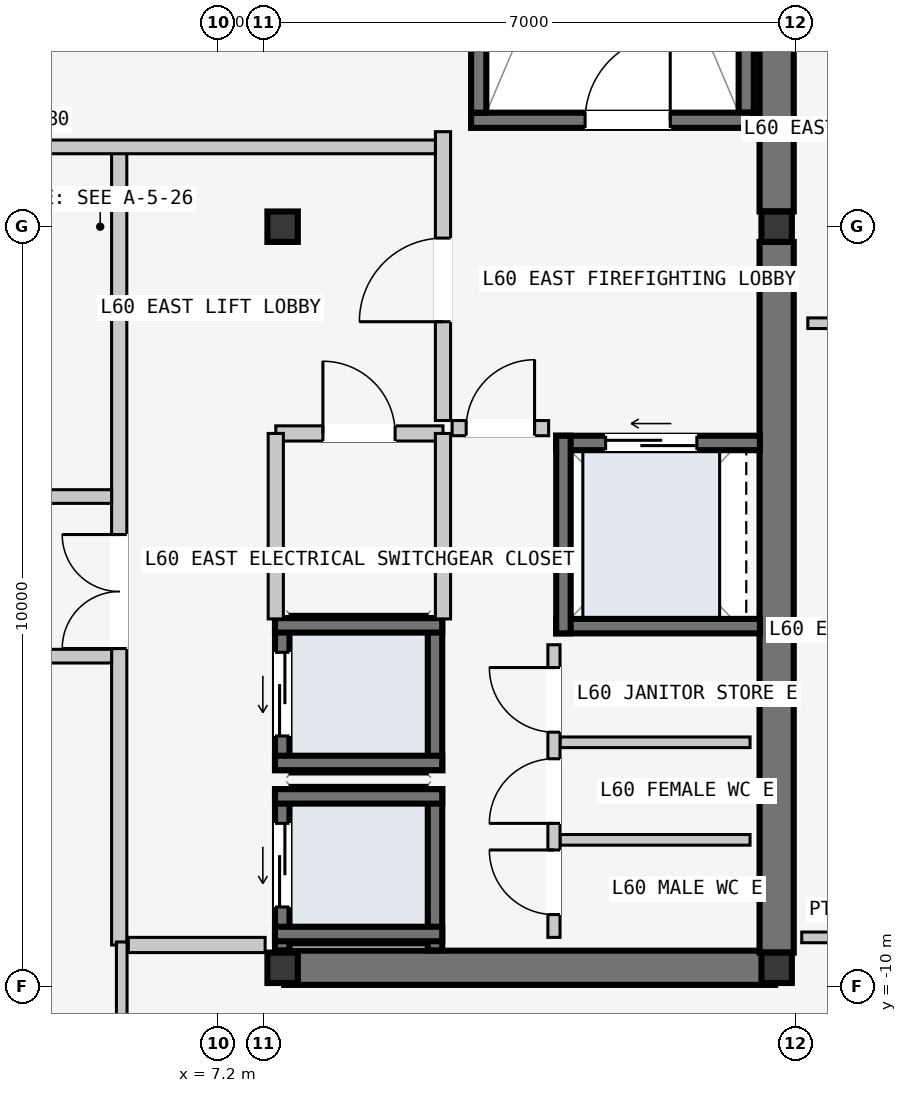
"""IFC4 building model, lengths in metres.
Left out: names, types, materials, properties, quantities, classifications, styles, units other than length and angle.
Written with IfcOpenShell. Run it as: python <this file> out.ifc"""

import sys

from ifc_helpers import new_model, si_unit, direction, frame, frame_2d, origin, origin_2d, place, context, subcontext, project, spatial, rectangle, i_section, extrude, element, fill, save


model = new_model("IFC4")
c1 = context("Model", 3, precision=1e-05, world=origin(), true_north=direction((0.0, 1.0)))
c2 = subcontext(c1, "Body", "Model", "MODEL_VIEW")
j1 = project(units=[si_unit("LENGTHUNIT", "METRE"), si_unit("PLANEANGLEUNIT", "RADIAN")], contexts=[c1])
p1 = place(None, origin())
s1 = spatial("IfcSite", under=j1, at=p1, CompositionType="ELEMENT")
p2 = place(p1, origin())
s2 = spatial("IfcBuilding", under=s1, at=p2, CompositionType="ELEMENT")
p3 = place(p2, frame((0.0, 0.0, 229.2)))
s3 = spatial("IfcBuildingStorey", under=s2, at=p3, CompositionType="ELEMENT", Elevation=229.2)
p4 = place(p3, frame((8.07, -9.75, -0.2), z_axis=(0.0, 0.0, 1.0), x_axis=(1.0, 0.0, 0.0)))
e1 = element("IfcWall", 1, at=p4, inside=s3, PredefinedType="SHEAR", context=c2, shape_type="SweptSolid", body=[
    extrude(rectangle(XDim=6.46, YDim=0.45, at=frame_2d((3.23, 0.0))), origin(), (0.0, 0.0, 1.0), 3.6),
])
for number, where, z_axis, x_axis in (
    (2, (14.55, -9.55, -0.2), (0.0, 0.0, 1.0), (0.0, 1.0, 0.0)),
    (3, (14.55, 0.2, -0.2), (0.0, 0.0, 1.0), (0.0, 1.0, 0.0)),
):
    element("IfcWall", number, at=place(p3, frame(where, z_axis=z_axis, x_axis=x_axis)), inside=s3, PredefinedType="SHEAR", context=c2, shape_type="SweptSolid", body=[
        extrude(rectangle(XDim=9.35, YDim=0.45, at=frame_2d((4.675, 0.0))), origin(), (0.0, 0.0, 1.0), 3.6),
    ])
p5 = place(p3, frame((14.15, 1.5, -0.2), z_axis=(0.0, 0.0, 1.0), x_axis=(0.0, 1.0, 0.0)))
e4 = element("IfcWall", 4, at=p5, inside=s3, PredefinedType="SOLIDWALL", context=c2, shape_type="SweptSolid", body=[
    extrude(rectangle(XDim=7.8, YDim=0.2, at=frame_2d((3.9, 0.0))), origin(), (0.0, 0.0, 1.0), 3.6),
])
p6 = place(p3, frame((10.53, 1.4, -0.2), z_axis=(0.0, 0.0, 1.0), x_axis=(1.0, 0.0, 0.0)))
e5 = element("IfcWall", 5, at=p6, inside=s3, PredefinedType="SOLIDWALL", context=c2, shape_type="SweptSolid", body=[
    extrude(rectangle(XDim=3.72, YDim=0.2, at=frame_2d((1.86, 0.0))), origin(), (0.0, 0.0, 1.0), 3.6),
])
p7 = place(p6, frame((1.5, 0.0, 0.2)))
e6 = element("IfcOpeningElement", 6, at=p7, cuts=e5, PredefinedType="OPENING", context=c2, shape_type="SweptSolid", body=[
    extrude(rectangle(XDim=1.12, YDim=2.18, at=frame_2d((0.56, 1.09))), frame((0.0, 0.11, 0.0), z_axis=(0.0, -1.0, 0.0), x_axis=(1.0, 0.0, 0.0)), (0.0, 0.0, 1.0), 0.22),
])
p8 = place(p3, frame((10.63, 1.5, -0.2), z_axis=(0.0, 0.0, 1.0), x_axis=(0.0, 1.0, 0.0)))
e7 = element("IfcWall", 7, at=p8, inside=s3, PredefinedType="SOLIDWALL", context=c2, shape_type="SweptSolid", body=[
    extrude(rectangle(XDim=7.8, YDim=0.2, at=frame_2d((3.9, 0.0))), origin(), (0.0, 0.0, 1.0), 3.6),
])
for number, where, z_axis, x_axis in (
    (8, (8.05, -9.75, 0.0), (0.0, 0.0, 1.0), (1.0, 0.0, 0.0)),
    (9, (8.05, 0.0, 0.0), (0.0, 0.0, 1.0), (1.0, 0.0, 0.0)),
    (10, (14.55, -9.75, 0.0), (0.0, 0.0, 1.0), (1.0, 0.0, 0.0)),
    (11, (14.55, 0.0, 0.0), (0.0, 0.0, 1.0), (1.0, 0.0, 0.0)),
):
    element("IfcColumn", number, at=place(p3, frame(where, z_axis=z_axis, x_axis=x_axis)), inside=s3, PredefinedType="COLUMN", context=c2, shape_type="SweptSolid", body=[
        extrude(i_section(OverallWidth=0.4, OverallDepth=0.4, WebThickness=0.013, FlangeThickness=0.021, at=origin_2d()), origin(), (0.0, 0.0, 1.0), 3.6),
    ])
p9 = place(p3, frame((8.045, -9.52, -0.2), z_axis=(0.0, 0.0, 1.0), x_axis=(0.0, 1.0, 0.0)))
e12 = element("IfcWall", 12, at=p9, inside=s3, PredefinedType="SOLIDWALL", context=c2, shape_type="SweptSolid", body=[
    extrude(rectangle(XDim=2.12, YDim=0.19, at=frame_2d((1.06, 0.0))), origin(), (0.0, 0.0, 1.0), 3.6),
])
p10 = place(p9, frame((0.57, 0.0, 0.2)))
e13 = element("IfcOpeningElement", 13, at=p10, cuts=e12, PredefinedType="OPENING", context=c2, shape_type="SweptSolid", body=[
    extrude(rectangle(XDim=1.1, YDim=2.2, at=frame_2d((0.55, 1.1))), frame((0.0, 0.105, 0.0), z_axis=(0.0, -1.0, 0.0), x_axis=(1.0, 0.0, 0.0)), (0.0, 0.0, 1.0), 0.21),
])
p11 = place(p3, frame((10.055, -9.52, -0.2), z_axis=(0.0, 0.0, 1.0), x_axis=(0.0, 1.0, 0.0)))
e14 = element("IfcWall", 14, at=p11, inside=s3, PredefinedType="SOLIDWALL", context=c2, shape_type="SweptSolid", body=[
    extrude(rectangle(XDim=2.12, YDim=0.19, at=frame_2d((1.06, 0.0))), origin(), (0.0, 0.0, 1.0), 3.6),
])
for number, where, z_axis, x_axis in (
    (15, (7.95, -7.495, -0.2), (0.0, 0.0, 1.0), (1.0, 0.0, 0.0)),
    (16, (7.95, -9.305, -0.2), (0.0, 0.0, 1.0), (1.0, 0.0, 0.0)),
):
    element("IfcWall", number, at=place(p3, frame(where, z_axis=z_axis, x_axis=x_axis)), inside=s3, PredefinedType="SOLIDWALL", context=c2, shape_type="SweptSolid", body=[
        extrude(rectangle(XDim=2.2, YDim=0.19, at=frame_2d((1.1, 0.0))), origin(), (0.0, 0.0, 1.0), 3.6),
    ])
p12 = place(p3, frame((8.045, -7.15, -0.2), z_axis=(0.0, 0.0, 1.0), x_axis=(0.0, 1.0, 0.0)))
e17 = element("IfcWall", 17, at=p12, inside=s3, PredefinedType="SOLIDWALL", context=c2, shape_type="SweptSolid", body=[
    extrude(rectangle(XDim=2.0, YDim=0.19, at=frame_2d((1.0, 0.0))), origin(), (0.0, 0.0, 1.0), 3.6),
])
p13 = place(p12, frame((0.45, 0.0, 0.2)))
e18 = element("IfcOpeningElement", 18, at=p13, cuts=e17, PredefinedType="OPENING", context=c2, shape_type="SweptSolid", body=[
    extrude(rectangle(XDim=1.1, YDim=2.2, at=frame_2d((0.55, 1.1))), frame((0.0, 0.105, 0.0), z_axis=(0.0, -1.0, 0.0), x_axis=(1.0, 0.0, 0.0)), (0.0, 0.0, 1.0), 0.21),
])
p14 = place(p3, frame((10.055, -7.15, -0.2), z_axis=(0.0, 0.0, 1.0), x_axis=(0.0, 1.0, 0.0)))
e19 = element("IfcWall", 19, at=p14, inside=s3, PredefinedType="SOLIDWALL", context=c2, shape_type="SweptSolid", body=[
    extrude(rectangle(XDim=2.0, YDim=0.19, at=frame_2d((1.0, 0.0))), origin(), (0.0, 0.0, 1.0), 3.6),
])
for number, where, z_axis, x_axis in (
    (20, (7.95, -5.245, -0.2), (0.0, 0.0, 1.0), (1.0, 0.0, 0.0)),
    (21, (7.95, -7.055, -0.2), (0.0, 0.0, 1.0), (1.0, 0.0, 0.0)),
):
    element("IfcWall", number, at=place(p3, frame(where, z_axis=z_axis, x_axis=x_axis)), inside=s3, PredefinedType="SOLIDWALL", context=c2, shape_type="SweptSolid", body=[
        extrude(rectangle(XDim=2.2, YDim=0.19, at=frame_2d((1.1, 0.0))), origin(), (0.0, 0.0, 1.0), 3.6),
    ])
p15 = place(p3, frame((11.65, -2.845, -0.2), z_axis=(0.0, 0.0, 1.0), x_axis=(1.0, 0.0, 0.0)))
e22 = element("IfcWall", 22, at=p15, inside=s3, PredefinedType="SOLIDWALL", context=c2, shape_type="SweptSolid", body=[
    extrude(rectangle(XDim=2.68, YDim=0.19, at=frame_2d((1.34, 0.0))), origin(), (0.0, 0.0, 1.0), 3.6),
])
p16 = place(p15, frame((0.65, 0.0, 0.2)))
e23 = element("IfcOpeningElement", 23, at=p16, cuts=e22, PredefinedType="OPENING", context=c2, shape_type="SweptSolid", body=[
    extrude(rectangle(XDim=1.2, YDim=2.2, at=frame_2d((0.6, 1.1))), frame((0.0, 0.105, 0.0), z_axis=(0.0, -1.0, 0.0), x_axis=(1.0, 0.0, 0.0)), (0.0, 0.0, 1.0), 0.21),
])
p17 = place(p3, frame((11.65, -5.255, -0.2), z_axis=(0.0, 0.0, 1.0), x_axis=(1.0, 0.0, 0.0)))
e24 = element("IfcWall", 24, at=p17, inside=s3, PredefinedType="SOLIDWALL", context=c2, shape_type="SweptSolid", body=[
    extrude(rectangle(XDim=2.68, YDim=0.19, at=frame_2d((1.34, 0.0))), origin(), (0.0, 0.0, 1.0), 3.6),
])
p18 = place(p3, frame((11.745, -5.35, -0.2), z_axis=(0.0, 0.0, 1.0), x_axis=(0.0, 1.0, 0.0)))
e25 = element("IfcWall", 25, at=p18, inside=s3, PredefinedType="SOLIDWALL", context=c2, shape_type="SweptSolid", body=[
    extrude(rectangle(XDim=2.6, YDim=0.19, at=frame_2d((1.3, 0.0))), origin(), (0.0, 0.0, 1.0), 3.6),
])
p19 = place(p3, frame((5.9, -9.45, 0.0), z_axis=(0.0, 0.0, 1.0), x_axis=(0.0, 1.0, 0.0)))
e26 = element("IfcWall", 26, at=p19, inside=s3, PredefinedType="PARTITIONING", context=c2, shape_type="SweptSolid", body=[
    extrude(rectangle(XDim=10.5, YDim=0.2, at=frame_2d((5.25, 0.0))), origin(), (0.0, 0.0, 1.0), 3.4),
])
p20 = place(p19, frame((3.9, 0.0, 0.0)))
e27 = element("IfcOpeningElement", 27, at=p20, cuts=e26, PredefinedType="OPENING", context=c2, shape_type="SweptSolid", body=[
    extrude(rectangle(XDim=1.5, YDim=2.2, at=frame_2d((0.75, 1.1))), frame((0.0, 0.11, 0.0), z_axis=(0.0, -1.0, 0.0), x_axis=(1.0, 0.0, 0.0)), (0.0, 0.0, 1.0), 0.22),
])
p21 = place(p3, frame((6.02, -9.45, 0.0), z_axis=(0.0, 0.0, 1.0), x_axis=(1.0, 0.0, 0.0)))
e28 = element("IfcWall", 28, at=p21, inside=s3, PredefinedType="PARTITIONING", context=c2, shape_type="SweptSolid", body=[
    extrude(rectangle(XDim=1.8, YDim=0.2, at=frame_2d((0.9, 0.0))), origin(), (0.0, 0.0, 1.0), 3.4),
])
p22 = place(p3, frame((10.16, -2.55, 0.0), z_axis=(0.0, 0.0, 1.0), x_axis=(0.0, 1.0, 0.0)))
e29 = element("IfcWall", 29, at=p22, inside=s3, PredefinedType="PARTITIONING", context=c2, shape_type="SweptSolid", body=[
    extrude(rectangle(XDim=3.8, YDim=0.2, at=frame_2d((1.9, 0.0))), origin(), (0.0, 0.0, 1.0), 3.4),
])
p23 = place(p22, frame((1.3, 0.0, 0.0)))
e30 = element("IfcOpeningElement", 30, at=p23, cuts=e29, PredefinedType="OPENING", context=c2, shape_type="SweptSolid", body=[
    extrude(rectangle(XDim=1.1, YDim=2.15, at=frame_2d((0.55, 1.075))), frame((0.0, 0.11, 0.0), z_axis=(0.0, -1.0, 0.0), x_axis=(1.0, 0.0, 0.0)), (0.0, 0.0, 1.0), 0.22),
])
p24 = place(p3, frame((10.28, -2.65, 0.0), z_axis=(0.0, 0.0, 1.0), x_axis=(1.0, 0.0, 0.0)))
e31 = element("IfcWall", 31, at=p24, inside=s3, PredefinedType="PARTITIONING", context=c2, shape_type="SweptSolid", body=[
    extrude(rectangle(XDim=1.27, YDim=0.2, at=frame_2d((0.635, 0.0))), origin(), (0.0, 0.0, 1.0), 3.4),
])
p25 = place(p24, frame((0.185, 0.0, 0.0)))
e32 = element("IfcOpeningElement", 32, at=p25, cuts=e31, PredefinedType="OPENING", context=c2, shape_type="SweptSolid", body=[
    extrude(rectangle(XDim=0.9, YDim=2.15, at=frame_2d((0.45, 1.075))), frame((0.0, 0.11, 0.0), z_axis=(0.0, -1.0, 0.0), x_axis=(1.0, 0.0, 0.0)), (0.0, 0.0, 1.0), 0.22),
])
p26 = place(p3, frame((7.96, -2.72, 0.0), z_axis=(0.0, 0.0, 1.0), x_axis=(1.0, 0.0, 0.0)))
e33 = element("IfcWall", 33, at=p26, inside=s3, PredefinedType="PARTITIONING", context=c2, shape_type="SweptSolid", body=[
    extrude(rectangle(XDim=2.2, YDim=0.2, at=frame_2d((1.1, 0.0))), origin(), (0.0, 0.0, 1.0), 3.4),
])
p27 = place(p26, frame((0.62, 0.0, 0.0)))
e34 = element("IfcOpeningElement", 34, at=p27, cuts=e33, PredefinedType="OPENING", context=c2, shape_type="SweptSolid", body=[
    extrude(rectangle(XDim=0.95, YDim=2.1, at=frame_2d((0.475, 1.05))), frame((0.0, 0.11, 0.0), z_axis=(0.0, -1.0, 0.0), x_axis=(1.0, 0.0, 0.0)), (0.0, 0.0, 1.0), 0.22),
])
for number, where, z_axis, x_axis in (
    (35, (7.96, -5.16, 0.0), (0.0, 0.0, 1.0), (0.0, 1.0, 0.0)),
    (36, (10.16, -5.16, 0.0), (0.0, 0.0, 1.0), (0.0, 1.0, 0.0)),
):
    element("IfcWall", number, at=place(p3, frame(where, z_axis=z_axis, x_axis=x_axis)), inside=s3, PredefinedType="PARTITIONING", context=c2, shape_type="SweptSolid", body=[
        extrude(rectangle(XDim=2.44, YDim=0.2, at=frame_2d((1.22, 0.0))), origin(), (0.0, 0.0, 1.0), 3.4),
    ])
for number, where, z_axis, x_axis in (
    (37, (11.7, -8.067, 0.0), (0.0, 0.0, 1.0), (1.0, 0.0, 0.0)),
    (38, (11.7, -6.783, 0.0), (0.0, 0.0, 1.0), (1.0, 0.0, 0.0)),
):
    element("IfcWall", number, at=place(p3, frame(where, z_axis=z_axis, x_axis=x_axis)), inside=s3, PredefinedType="PARTITIONING", context=c2, shape_type="SweptSolid", body=[
        extrude(rectangle(XDim=2.5, YDim=0.14, at=frame_2d((1.25, 0.0))), origin(), (0.0, 0.0, 1.0), 3.4),
    ])
p28 = place(p3, frame((11.62, -9.35, 0.0), z_axis=(0.0, 0.0, 1.0), x_axis=(0.0, 1.0, 0.0)))
e39 = element("IfcWall", 39, at=p28, inside=s3, PredefinedType="PARTITIONING", context=c2, shape_type="SweptSolid", body=[
    extrude(rectangle(XDim=3.85, YDim=0.16, at=frame_2d((1.925, 0.0))), origin(), (0.0, 0.0, 1.0), 3.4),
])
p29 = place(p28, frame((0.3, 0.0, 0.0)))
e40 = element("IfcOpeningElement", 40, at=p29, cuts=e39, PredefinedType="OPENING", context=c2, shape_type="SweptSolid", body=[
    extrude(rectangle(XDim=0.85, YDim=2.12, at=frame_2d((0.425, 1.06))), frame((0.0, 0.09, 0.0), z_axis=(0.0, -1.0, 0.0), x_axis=(1.0, 0.0, 0.0)), (0.0, 0.0, 1.0), 0.18),
])
p30 = place(p28, frame((1.5, 0.0, 0.0)))
e41 = element("IfcOpeningElement", 41, at=p30, cuts=e39, PredefinedType="OPENING", context=c2, shape_type="SweptSolid", body=[
    extrude(rectangle(XDim=0.85, YDim=2.12, at=frame_2d((0.425, 1.06))), frame((0.0, 0.09, 0.0), z_axis=(0.0, -1.0, 0.0), x_axis=(1.0, 0.0, 0.0)), (0.0, 0.0, 1.0), 0.18),
])
p31 = place(p28, frame((2.7, 0.0, 0.0)))
e42 = element("IfcOpeningElement", 42, at=p31, cuts=e39, PredefinedType="OPENING", context=c2, shape_type="SweptSolid", body=[
    extrude(rectangle(XDim=0.85, YDim=2.12, at=frame_2d((0.425, 1.06))), frame((0.0, 0.09, 0.0), z_axis=(0.0, -1.0, 0.0), x_axis=(1.0, 0.0, 0.0)), (0.0, 0.0, 1.0), 0.18),
])
p32 = place(p3, frame((-0.49, 1.05, 0.0), z_axis=(0.0, 0.0, 1.0), x_axis=(1.0, 0.0, 0.0)))
e43 = element("IfcWall", 43, at=p32, inside=s3, PredefinedType="PARTITIONING", context=c2, shape_type="SweptSolid", body=[
    extrude(rectangle(XDim=10.55, YDim=0.18, at=frame_2d((5.275, 0.0))), origin(), (0.0, 0.0, 1.0), 3.4),
])
for number, where, z_axis, x_axis in (
    (44, (-0.49, -3.55, 0.0), (0.0, 0.0, 1.0), (1.0, 0.0, 0.0)),
    (45, (-0.49, -5.65, 0.0), (0.0, 0.0, 1.0), (1.0, 0.0, 0.0)),
):
    element("IfcWall", number, at=place(p3, frame(where, z_axis=z_axis, x_axis=x_axis)), inside=s3, PredefinedType="PARTITIONING", context=c2, shape_type="SweptSolid", body=[
        extrude(rectangle(XDim=6.29, YDim=0.18, at=frame_2d((3.145, 0.0))), origin(), (0.0, 0.0, 1.0), 3.4),
    ])
p33 = place(p3, frame((5.933, -17.56, 0.0), z_axis=(0.0, 0.0, 1.0), x_axis=(0.0, 1.0, 0.0)))
e46 = element("IfcWall", 46, at=p33, inside=s3, PredefinedType="PARTITIONING", context=c2, shape_type="SweptSolid", body=[
    extrude(rectangle(XDim=8.15, YDim=0.14, at=frame_2d((4.075, 0.0))), origin(), (0.0, 0.0, 1.0), 3.4),
])
p34 = place(p33, frame((1.05, 0.0, 0.0)))
e47 = element("IfcOpeningElement", 47, at=p34, cuts=e46, PredefinedType="OPENING", context=c2, shape_type="SweptSolid", body=[
    extrude(rectangle(XDim=0.96, YDim=2.18, at=frame_2d((0.48, 1.09))), frame((0.0, 0.08, 0.0), z_axis=(0.0, -1.0, 0.0), x_axis=(1.0, 0.0, 0.0)), (0.0, 0.0, 1.0), 0.16),
])
p35 = place(p3, frame((14.88, -9.35, 0.0), z_axis=(0.0, 0.0, 1.0), x_axis=(1.0, 0.0, 0.0)))
e48 = element("IfcWall", 48, at=p35, inside=s3, PredefinedType="PARTITIONING", context=c2, shape_type="SweptSolid", body=[
    extrude(rectangle(XDim=3.68, YDim=0.14, at=frame_2d((1.84, 0.0))), origin(), (0.0, 0.0, 1.0), 3.4),
])
p36 = place(p35, frame((1.36, 0.0, 0.0)))
e49 = element("IfcOpeningElement", 49, at=p36, cuts=e48, PredefinedType="OPENING", context=c2, shape_type="SweptSolid", body=[
    extrude(rectangle(XDim=0.96, YDim=2.18, at=frame_2d((0.48, 1.09))), frame((0.0, 0.08, 0.0), z_axis=(0.0, -1.0, 0.0), x_axis=(1.0, 0.0, 0.0)), (0.0, 0.0, 1.0), 0.16),
])
p37 = place(p3, frame((14.96, -1.27, 0.0), z_axis=(0.0, 0.0, 1.0), x_axis=(1.0, 0.0, 0.0)))
e50 = element("IfcWall", 50, at=p37, inside=s3, PredefinedType="PARTITIONING", context=c2, shape_type="SweptSolid", body=[
    extrude(rectangle(XDim=2.59, YDim=0.14, at=frame_2d((1.295, 0.0))), origin(), (0.0, 0.0, 1.0), 3.4),
])
p38 = place(p37, frame((0.9, 0.0, 0.0)))
e51 = element("IfcOpeningElement", 51, at=p38, cuts=e50, PredefinedType="OPENING", context=c2, shape_type="SweptSolid", body=[
    extrude(rectangle(XDim=0.96, YDim=2.18, at=frame_2d((0.48, 1.09))), frame((0.0, 0.08, 0.0), z_axis=(0.0, -1.0, 0.0), x_axis=(1.0, 0.0, 0.0)), (0.0, 0.0, 1.0), 0.16),
])
p39 = place(p7, origin())
e52 = element("IfcDoor", 52, at=p39, inside=s3, OperationType="SINGLE_SWING_RIGHT", PredefinedType="DOOR", context=c2, shape_type="SweptSolid", body=[
    extrude(rectangle(XDim=1.12, YDim=2.18, at=frame_2d((0.56, 1.09))), frame((0.0, 0.025, 0.0), z_axis=(0.0, -1.0, 0.0), x_axis=(1.0, 0.0, 0.0)), (0.0, 0.0, 1.0), 0.05),
])
fill(e6, e52)
p40 = place(p10, origin())
e53 = element("IfcDoor", 53, at=p40, inside=s3, OperationType="SLIDING_TO_LEFT", PredefinedType="DOOR", context=c2, shape_type="SweptSolid", body=[
    extrude(rectangle(XDim=1.1, YDim=2.2, at=frame_2d((0.55, 1.1))), frame((0.0, 0.025, 0.0), z_axis=(0.0, -1.0, 0.0), x_axis=(1.0, 0.0, 0.0)), (0.0, 0.0, 1.0), 0.05),
])
fill(e13, e53)
p41 = place(p13, origin())
e54 = element("IfcDoor", 54, at=p41, inside=s3, OperationType="SLIDING_TO_LEFT", PredefinedType="DOOR", context=c2, shape_type="SweptSolid", body=[
    extrude(rectangle(XDim=1.1, YDim=2.2, at=frame_2d((0.55, 1.1))), frame((0.0, 0.025, 0.0), z_axis=(0.0, -1.0, 0.0), x_axis=(1.0, 0.0, 0.0)), (0.0, 0.0, 1.0), 0.05),
])
fill(e18, e54)
p42 = place(p16, origin())
e55 = element("IfcDoor", 55, at=p42, inside=s3, OperationType="SLIDING_TO_LEFT", PredefinedType="DOOR", context=c2, shape_type="SweptSolid", body=[
    extrude(rectangle(XDim=1.2, YDim=2.2, at=frame_2d((0.6, 1.1))), frame((0.0, 0.025, 0.0), z_axis=(0.0, -1.0, 0.0), x_axis=(1.0, 0.0, 0.0)), (0.0, 0.0, 1.0), 0.05),
])
fill(e23, e55)
p43 = place(p20, origin())
e56 = element("IfcDoor", 56, at=p43, inside=s3, OperationType="DOUBLE_DOOR_SINGLE_SWING", PredefinedType="DOOR", context=c2, shape_type="SweptSolid", body=[
    extrude(rectangle(XDim=1.5, YDim=2.2, at=frame_2d((0.75, 1.1))), frame((0.0, 0.025, 0.0), z_axis=(0.0, -1.0, 0.0), x_axis=(1.0, 0.0, 0.0)), (0.0, 0.0, 1.0), 0.05),
])
fill(e27, e56)
p44 = place(p23, origin())
e57 = element("IfcDoor", 57, at=p44, inside=s3, OperationType="SINGLE_SWING_LEFT", PredefinedType="DOOR", context=c2, shape_type="SweptSolid", body=[
    extrude(rectangle(XDim=1.1, YDim=2.15, at=frame_2d((0.55, 1.075))), frame((0.0, 0.025, 0.0), z_axis=(0.0, -1.0, 0.0), x_axis=(1.0, 0.0, 0.0)), (0.0, 0.0, 1.0), 0.05),
])
fill(e30, e57)
p45 = place(p25, origin())
e58 = element("IfcDoor", 58, at=p45, inside=s3, OperationType="SINGLE_SWING_RIGHT", PredefinedType="DOOR", context=c2, shape_type="SweptSolid", body=[
    extrude(rectangle(XDim=0.9, YDim=2.15, at=frame_2d((0.45, 1.075))), frame((0.0, 0.025, 0.0), z_axis=(0.0, -1.0, 0.0), x_axis=(1.0, 0.0, 0.0)), (0.0, 0.0, 1.0), 0.05),
])
fill(e32, e58)
p46 = place(p27, origin())
e59 = element("IfcDoor", 59, at=p46, inside=s3, OperationType="SINGLE_SWING_LEFT", PredefinedType="DOOR", context=c2, shape_type="SweptSolid", body=[
    extrude(rectangle(XDim=0.95, YDim=2.1, at=frame_2d((0.475, 1.05))), frame((0.0, 0.025, 0.0), z_axis=(0.0, -1.0, 0.0), x_axis=(1.0, 0.0, 0.0)), (0.0, 0.0, 1.0), 0.05),
])
fill(e34, e59)
p47 = place(p29, origin())
e60 = element("IfcDoor", 60, at=p47, inside=s3, OperationType="SINGLE_SWING_RIGHT", PredefinedType="DOOR", context=c2, shape_type="SweptSolid", body=[
    extrude(rectangle(XDim=0.85, YDim=2.12, at=frame_2d((0.425, 1.06))), frame((0.0, 0.025, 0.0), z_axis=(0.0, -1.0, 0.0), x_axis=(1.0, 0.0, 0.0)), (0.0, 0.0, 1.0), 0.05),
])
fill(e40, e60)
p48 = place(p30, origin())
e61 = element("IfcDoor", 61, at=p48, inside=s3, OperationType="SINGLE_SWING_LEFT", PredefinedType="DOOR", context=c2, shape_type="SweptSolid", body=[
    extrude(rectangle(XDim=0.85, YDim=2.12, at=frame_2d((0.425, 1.06))), frame((0.0, 0.025, 0.0), z_axis=(0.0, -1.0, 0.0), x_axis=(1.0, 0.0, 0.0)), (0.0, 0.0, 1.0), 0.05),
])
fill(e41, e61)
p49 = place(p31, origin())
e62 = element("IfcDoor", 62, at=p49, inside=s3, OperationType="SINGLE_SWING_RIGHT", PredefinedType="DOOR", context=c2, shape_type="SweptSolid", body=[
    extrude(rectangle(XDim=0.85, YDim=2.12, at=frame_2d((0.425, 1.06))), frame((0.0, 0.025, 0.0), z_axis=(0.0, -1.0, 0.0), x_axis=(1.0, 0.0, 0.0)), (0.0, 0.0, 1.0), 0.05),
])
fill(e42, e62)
save(model, sys.argv[1])
